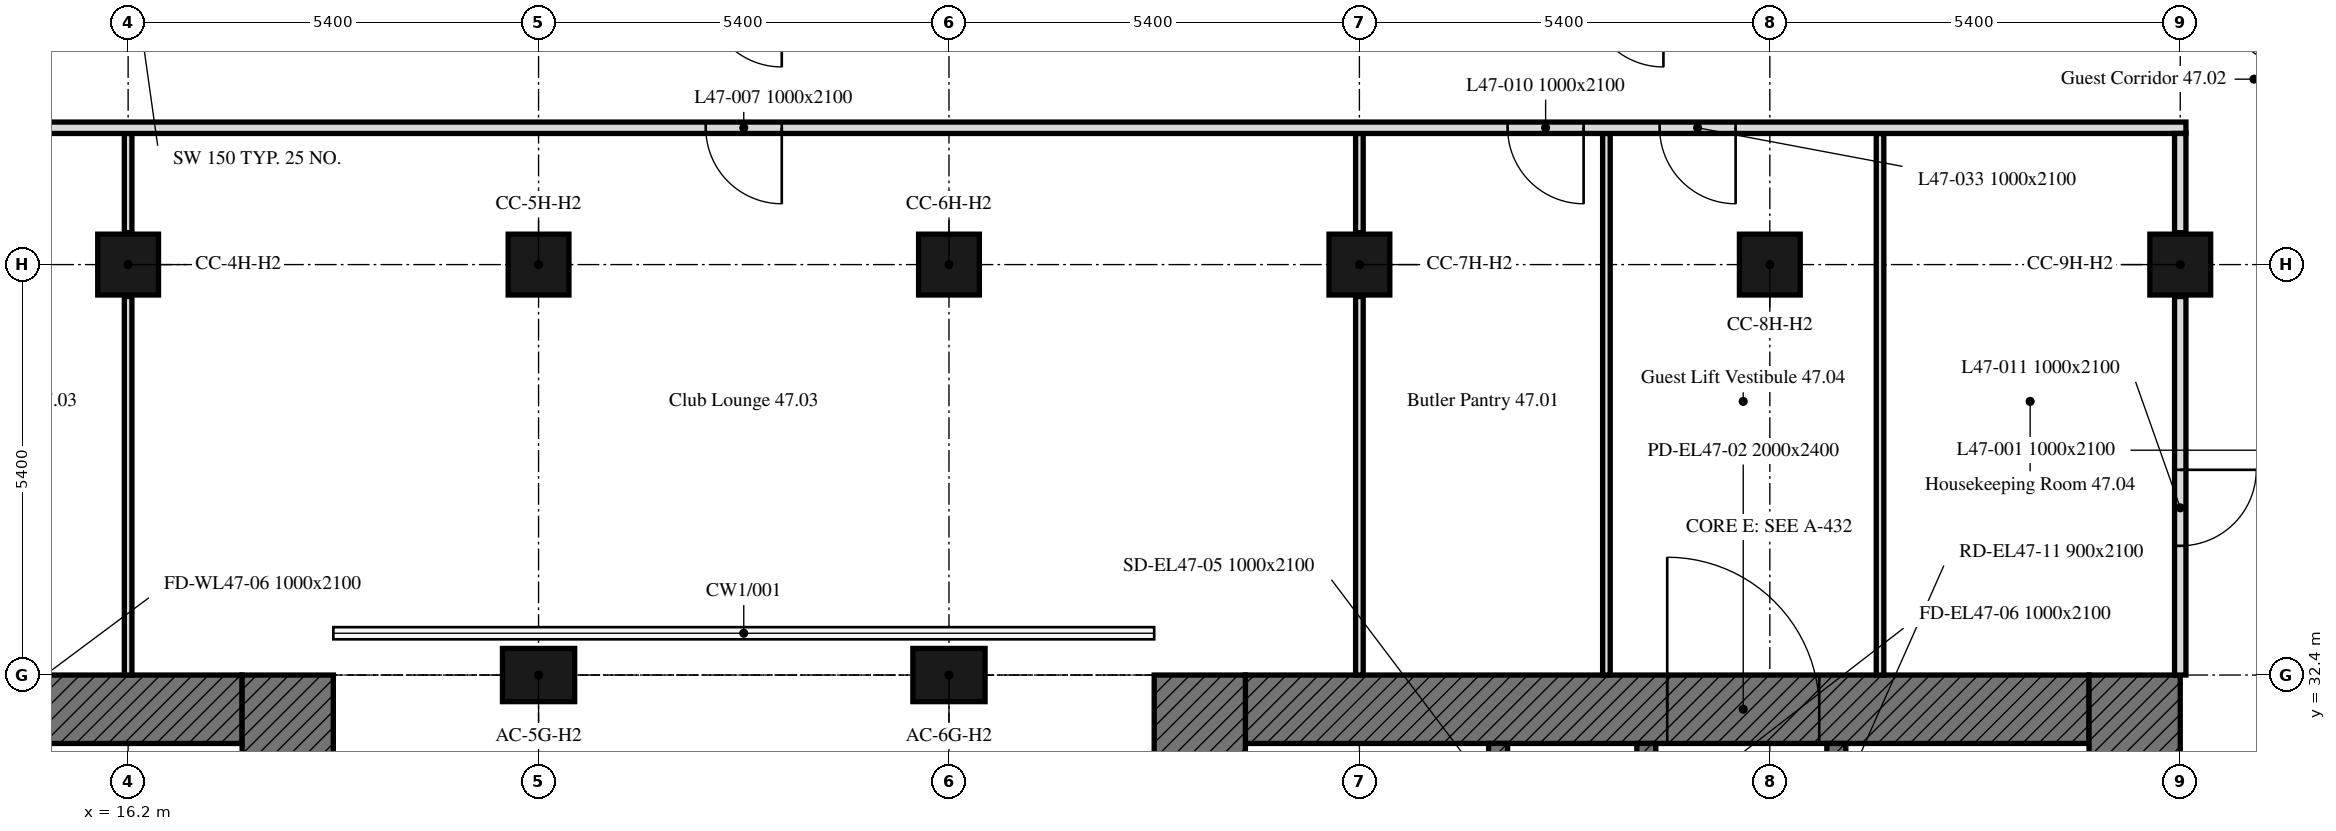
"""IFC4 building model, lengths in metres.
Left out: names, types, materials, properties, quantities, classifications, styles, units other than length and angle.
Written with IfcOpenShell. Run it as: python <this file> out.ifc"""

import sys

from ifc_helpers import new_model, si_unit, direction, frame, frame_2d, origin, origin_2d, place, context, subcontext, project, spatial, rectangle, extrude, element, fill, save


model = new_model("IFC4")
c1 = context("Model", 3, precision=1e-05, world=origin(), true_north=direction((0.0, 1.0)))
c2 = subcontext(c1, "Body", "Model", "MODEL_VIEW")
j1 = project(units=[si_unit("LENGTHUNIT", "METRE"), si_unit("PLANEANGLEUNIT", "RADIAN")], contexts=[c1])
p1 = place(None, origin())
s1 = spatial("IfcSite", under=j1, at=p1, CompositionType="ELEMENT")
p2 = place(p1, origin())
s2 = spatial("IfcBuilding", under=s1, at=p2, CompositionType="ELEMENT")
p3 = place(p2, frame((0.0, 0.0, 193.9)))
s3 = spatial("IfcBuildingStorey", under=s2, at=p3, CompositionType="ELEMENT", Elevation=193.9)
for number, where, z_axis, x_axis in (
    (1, (21.6, 32.4, 0.0), (0.0, 0.0, 1.0), (1.0, 0.0, 0.0)),
    (2, (27.0, 32.4, 0.0), (0.0, 0.0, 1.0), (1.0, 0.0, 0.0)),
):
    element("IfcColumn", number, at=place(p3, frame(where, z_axis=z_axis, x_axis=x_axis)), inside=s3, PredefinedType="COLUMN", context=c2, shape_type="SweptSolid", body=[
        extrude(rectangle(XDim=0.95, YDim=0.7, at=origin_2d()), origin(), (0.0, 0.0, 1.0), 3.0),
    ])
for number, where, z_axis, x_axis in (
    (3, (16.2, 37.8, 0.0), (0.0, 0.0, 1.0), (1.0, 0.0, 0.0)),
    (4, (21.6, 37.8, 0.0), (0.0, 0.0, 1.0), (1.0, 0.0, 0.0)),
    (5, (27.0, 37.8, 0.0), (0.0, 0.0, 1.0), (1.0, 0.0, 0.0)),
    (6, (32.4, 37.8, 0.0), (0.0, 0.0, 1.0), (1.0, 0.0, 0.0)),
    (7, (37.8, 37.8, 0.0), (0.0, 0.0, 1.0), (1.0, 0.0, 0.0)),
    (8, (43.2, 37.8, 0.0), (0.0, 0.0, 1.0), (1.0, 0.0, 0.0)),
):
    element("IfcColumn", number, at=place(p3, frame(where, z_axis=z_axis, x_axis=x_axis)), inside=s3, PredefinedType="COLUMN", context=c2, shape_type="SweptSolid", body=[
        extrude(rectangle(XDim=0.8, YDim=0.8, at=origin_2d()), origin(), (0.0, 0.0, 1.0), 3.0),
    ])
p4 = place(p3, frame((6.6, 31.95, 0.0), z_axis=(0.0, 0.0, 1.0), x_axis=(1.0, 0.0, 0.0)))
e9 = element("IfcWall", 9, at=p4, inside=s3, PredefinedType="SOLIDWALL", context=c2, shape_type="SweptSolid", body=[
    extrude(rectangle(XDim=11.1, YDim=0.9, at=frame_2d((5.55, 0.0))), origin(), (0.0, 0.0, 1.0), 3.0),
])
p5 = place(p4, frame((3.55, 0.0, 0.0)))
e10 = element("IfcOpeningElement", 10, at=p5, cuts=e9, PredefinedType="OPENING", context=c2, shape_type="SweptSolid", body=[
    extrude(rectangle(XDim=2.0, YDim=2.4, at=frame_2d((1.0, 1.2))), frame((0.0, 0.45, 0.0), z_axis=(0.0, -1.0, 0.0), x_axis=(1.0, 0.0, 0.0)), (0.0, 0.0, 1.0), 0.9),
])
p6 = place(p3, frame((18.3, 32.4, 0.0), z_axis=(0.0, 0.0, 1.0), x_axis=(0.0, -1.0, 0.0)))
e11 = element("IfcWall", 11, at=p6, inside=s3, PredefinedType="SOLIDWALL", context=c2, shape_type="SweptSolid", body=[
    extrude(rectangle(XDim=16.2, YDim=1.2, at=frame_2d((8.1, 0.0))), origin(), (0.0, 0.0, 1.0), 3.0),
])
p7 = place(p3, frame((30.9, 31.95, 0.0), z_axis=(0.0, 0.0, 1.0), x_axis=(1.0, 0.0, 0.0)))
e12 = element("IfcWall", 12, at=p7, inside=s3, PredefinedType="SOLIDWALL", context=c2, shape_type="SweptSolid", body=[
    extrude(rectangle(XDim=11.1, YDim=0.9, at=frame_2d((5.55, 0.0))), origin(), (0.0, 0.0, 1.0), 3.0),
])
p8 = place(p7, frame((5.55, 0.0, 0.0)))
e13 = element("IfcOpeningElement", 13, at=p8, cuts=e12, PredefinedType="OPENING", context=c2, shape_type="SweptSolid", body=[
    extrude(rectangle(XDim=2.0, YDim=2.4, at=frame_2d((1.0, 1.2))), frame((0.0, 0.45, 0.0), z_axis=(0.0, -1.0, 0.0), x_axis=(1.0, 0.0, 0.0)), (0.0, 0.0, 1.0), 0.9),
])
for number, where, z_axis, x_axis in (
    (14, (42.6, 32.4, 0.0), (0.0, 0.0, 1.0), (0.0, -1.0, 0.0)),
    (15, (30.3, 16.2, 0.0), (0.0, 0.0, 1.0), (0.0, 1.0, 0.0)),
):
    element("IfcWall", number, at=place(p3, frame(where, z_axis=z_axis, x_axis=x_axis)), inside=s3, PredefinedType="SOLIDWALL", context=c2, shape_type="SweptSolid", body=[
        extrude(rectangle(XDim=16.2, YDim=1.2, at=frame_2d((8.1, 0.0))), origin(), (0.0, 0.0, 1.0), 3.0),
    ])
p9 = place(p3, frame((38.675, 17.1, 0.0), z_axis=(0.0, 0.0, 1.0), x_axis=(0.0, 1.0, 0.0)))
e16 = element("IfcWall", 16, at=p9, inside=s3, PredefinedType="SOLIDWALL", context=c2, shape_type="SweptSolid", body=[
    extrude(rectangle(XDim=14.4, YDim=0.25, at=frame_2d((7.2, 0.0))), origin(), (0.0, 0.0, 1.0), 3.0),
])
p10 = place(p9, frame((4.6, 0.0, 0.0)))
e17 = element("IfcOpeningElement", 17, at=p10, cuts=e16, PredefinedType="OPENING", context=c2, shape_type="SweptSolid", body=[
    extrude(rectangle(XDim=1.0, YDim=2.1, at=frame_2d((0.5, 1.05))), frame((0.0, 0.125, 0.0), z_axis=(0.0, -1.0, 0.0), x_axis=(1.0, 0.0, 0.0)), (0.0, 0.0, 1.0), 0.25),
])
p11 = place(p9, frame((7.062, 0.0, 0.0)))
e18 = element("IfcOpeningElement", 18, at=p11, cuts=e16, PredefinedType="OPENING", context=c2, shape_type="SweptSolid", body=[
    extrude(rectangle(XDim=1.2, YDim=2.1, at=frame_2d((0.6, 1.05))), frame((0.0, 0.125, 0.0), z_axis=(0.0, -1.0, 0.0), x_axis=(1.0, 0.0, 0.0)), (0.0, 0.0, 1.0), 0.25),
])
p12 = place(p9, frame((9.472, 0.0, 0.0)))
e19 = element("IfcOpeningElement", 19, at=p12, cuts=e16, PredefinedType="OPENING", context=c2, shape_type="SweptSolid", body=[
    extrude(rectangle(XDim=0.9, YDim=2.1, at=frame_2d((0.45, 1.05))), frame((0.0, 0.125, 0.0), z_axis=(0.0, -1.0, 0.0), x_axis=(1.0, 0.0, 0.0)), (0.0, 0.0, 1.0), 0.25),
])
p13 = place(p9, frame((11.159, 0.0, 0.0)))
e20 = element("IfcOpeningElement", 20, at=p13, cuts=e16, PredefinedType="OPENING", context=c2, shape_type="SweptSolid", body=[
    extrude(rectangle(XDim=0.9, YDim=2.1, at=frame_2d((0.45, 1.05))), frame((0.0, 0.125, 0.0), z_axis=(0.0, -1.0, 0.0), x_axis=(1.0, 0.0, 0.0)), (0.0, 0.0, 1.0), 0.25),
])
p14 = place(p9, frame((13.1, 0.0, 0.0)))
e21 = element("IfcOpeningElement", 21, at=p14, cuts=e16, PredefinedType="OPENING", context=c2, shape_type="SweptSolid", body=[
    extrude(rectangle(XDim=0.9, YDim=2.1, at=frame_2d((0.45, 1.05))), frame((0.0, 0.125, 0.0), z_axis=(0.0, -1.0, 0.0), x_axis=(1.0, 0.0, 0.0)), (0.0, 0.0, 1.0), 0.25),
])
p15 = place(p3, frame((34.225, 17.1, 0.0), z_axis=(0.0, 0.0, 1.0), x_axis=(0.0, 1.0, 0.0)))
e22 = element("IfcWall", 22, at=p15, inside=s3, PredefinedType="SOLIDWALL", context=c2, shape_type="SweptSolid", body=[
    extrude(rectangle(XDim=14.4, YDim=0.25, at=frame_2d((7.2, 0.0))), origin(), (0.0, 0.0, 1.0), 3.0),
])
p16 = place(p15, frame((13.15, 0.0, 0.0)))
e23 = element("IfcOpeningElement", 23, at=p16, cuts=e22, PredefinedType="OPENING", context=c2, shape_type="SweptSolid", body=[
    extrude(rectangle(XDim=1.0, YDim=2.1, at=frame_2d((0.5, 1.05))), frame((0.0, 0.125, 0.0), z_axis=(0.0, -1.0, 0.0), x_axis=(1.0, 0.0, 0.0)), (0.0, 0.0, 1.0), 0.25),
])
p17 = place(p15, frame((0.6, 0.0, 0.0)))
e24 = element("IfcOpeningElement", 24, at=p17, cuts=e22, PredefinedType="OPENING", context=c2, shape_type="SweptSolid", body=[
    extrude(rectangle(XDim=1.1, YDim=2.1, at=frame_2d((0.55, 1.05))), frame((0.0, 0.125, 0.0), z_axis=(0.0, -1.0, 0.0), x_axis=(1.0, 0.0, 0.0)), (0.0, 0.0, 1.0), 0.25),
])
p18 = place(p15, frame((3.25, 0.0, 0.0)))
e25 = element("IfcOpeningElement", 25, at=p18, cuts=e22, PredefinedType="OPENING", context=c2, shape_type="SweptSolid", body=[
    extrude(rectangle(XDim=0.9, YDim=2.1, at=frame_2d((0.45, 1.05))), frame((0.0, 0.125, 0.0), z_axis=(0.0, -1.0, 0.0), x_axis=(1.0, 0.0, 0.0)), (0.0, 0.0, 1.0), 0.25),
])
p19 = place(p3, frame((36.175, 29.4, 0.0), z_axis=(0.0, 0.0, 1.0), x_axis=(0.0, 1.0, 0.0)))
e26 = element("IfcWall", 26, at=p19, inside=s3, PredefinedType="SOLIDWALL", context=c2, shape_type="SweptSolid", body=[
    extrude(rectangle(XDim=2.1, YDim=0.25, at=frame_2d((1.05, 0.0))), origin(), (0.0, 0.0, 1.0), 3.0),
])
p20 = place(p19, frame((0.5, 0.0, 0.0)))
e27 = element("IfcOpeningElement", 27, at=p20, cuts=e26, PredefinedType="OPENING", context=c2, shape_type="SweptSolid", body=[
    extrude(rectangle(XDim=1.0, YDim=2.1, at=frame_2d((0.5, 1.05))), frame((0.0, 0.125, 0.0), z_axis=(0.0, -1.0, 0.0), x_axis=(1.0, 0.0, 0.0)), (0.0, 0.0, 1.0), 0.25),
])
p21 = place(p3, frame((16.2, 39.525, 0.0), z_axis=(0.0, 0.0, 1.0), x_axis=(0.0, -1.0, 0.0)))
e28 = element("IfcWall", 28, at=p21, inside=s3, PredefinedType="PARTITIONING", context=c2, shape_type="SweptSolid", body=[
    extrude(rectangle(XDim=1.305, YDim=0.1, at=frame_2d((0.652, 0.0))), origin(), (0.0, 0.0, 1.0), 2.4),
])
for number, where, z_axis, x_axis in (
    (29, (16.2, 37.38, 0.0), (0.0, 0.0, 1.0), (0.0, -1.0, 0.0)),
    (30, (32.4, 32.4, 0.0), (0.0, 0.0, 1.0), (0.0, 1.0, 0.0)),
):
    element("IfcWall", number, at=place(p3, frame(where, z_axis=z_axis, x_axis=x_axis)), inside=s3, PredefinedType="PARTITIONING", context=c2, shape_type="SweptSolid", body=[
        extrude(rectangle(XDim=4.98, YDim=0.1, at=frame_2d((2.49, 0.0))), origin(), (0.0, 0.0, 1.0), 2.4),
    ])
p22 = place(p3, frame((32.4, 38.22, 0.0), z_axis=(0.0, 0.0, 1.0), x_axis=(0.0, 1.0, 0.0)))
e31 = element("IfcWall", 31, at=p22, inside=s3, PredefinedType="PARTITIONING", context=c2, shape_type="SweptSolid", body=[
    extrude(rectangle(XDim=1.305, YDim=0.1, at=frame_2d((0.652, 0.0))), origin(), (0.0, 0.0, 1.0), 2.4),
])
for number, where, z_axis, x_axis in (
    (32, (35.65, 39.525, 0.0), (0.0, 0.0, 1.0), (0.0, -1.0, 0.0)),
    (33, (39.25, 32.4, 0.0), (0.0, 0.0, 1.0), (0.0, 1.0, 0.0)),
):
    element("IfcWall", number, at=place(p3, frame(where, z_axis=z_axis, x_axis=x_axis)), inside=s3, PredefinedType="PARTITIONING", context=c2, shape_type="SweptSolid", body=[
        extrude(rectangle(XDim=7.125, YDim=0.1, at=frame_2d((3.562, 0.0))), origin(), (0.0, 0.0, 1.0), 2.4),
    ])
p23 = place(p3, frame((43.275, 39.6, 0.0), z_axis=(0.0, 0.0, 1.0), x_axis=(-1.0, 0.0, 0.0)))
e34 = element("IfcWall", 34, at=p23, inside=s3, PredefinedType="PARTITIONING", context=c2, shape_type="SweptSolid", body=[
    extrude(rectangle(XDim=36.049, YDim=0.15, at=frame_2d((18.024, 0.0))), origin(), (0.0, 0.0, 1.0), 2.4),
])
p24 = place(p23, frame((18.475, 0.0, 0.0)))
e35 = element("IfcOpeningElement", 35, at=p24, cuts=e34, PredefinedType="OPENING", context=c2, shape_type="SweptSolid", body=[
    extrude(rectangle(XDim=1.0, YDim=2.1, at=frame_2d((0.5, 1.05))), frame((0.0, 0.075, 0.0), z_axis=(0.0, -1.0, 0.0), x_axis=(1.0, 0.0, 0.0)), (0.0, 0.0, 1.0), 0.15),
])
p25 = place(p23, frame((34.799, 0.0, 0.0)))
e36 = element("IfcOpeningElement", 36, at=p25, cuts=e34, PredefinedType="OPENING", context=c2, shape_type="SweptSolid", body=[
    extrude(rectangle(XDim=1.0, YDim=2.1, at=frame_2d((0.5, 1.05))), frame((0.0, 0.075, 0.0), z_axis=(0.0, -1.0, 0.0), x_axis=(1.0, 0.0, 0.0)), (0.0, 0.0, 1.0), 0.15),
])
p26 = place(p23, frame((7.925, 0.0, 0.0)))
e37 = element("IfcOpeningElement", 37, at=p26, cuts=e34, PredefinedType="OPENING", context=c2, shape_type="SweptSolid", body=[
    extrude(rectangle(XDim=1.0, YDim=2.1, at=frame_2d((0.5, 1.05))), frame((0.0, 0.075, 0.0), z_axis=(0.0, -1.0, 0.0), x_axis=(1.0, 0.0, 0.0)), (0.0, 0.0, 1.0), 0.15),
])
p27 = place(p23, frame((29.025, 0.0, 0.0)))
e38 = element("IfcOpeningElement", 38, at=p27, cuts=e34, PredefinedType="OPENING", context=c2, shape_type="SweptSolid", body=[
    extrude(rectangle(XDim=1.0, YDim=2.1, at=frame_2d((0.5, 1.05))), frame((0.0, 0.075, 0.0), z_axis=(0.0, -1.0, 0.0), x_axis=(1.0, 0.0, 0.0)), (0.0, 0.0, 1.0), 0.15),
])
p28 = place(p23, frame((30.495, 0.0, 0.0)))
e39 = element("IfcOpeningElement", 39, at=p28, cuts=e34, PredefinedType="OPENING", context=c2, shape_type="SweptSolid", body=[
    extrude(rectangle(XDim=1.8, YDim=2.4, at=frame_2d((0.9, 1.2))), frame((0.0, 0.075, 0.0), z_axis=(0.0, -1.0, 0.0), x_axis=(1.0, 0.0, 0.0)), (0.0, 0.0, 1.0), 0.15),
])
p29 = place(p23, frame((5.925, 0.0, 0.0)))
e40 = element("IfcOpeningElement", 40, at=p29, cuts=e34, PredefinedType="OPENING", context=c2, shape_type="SweptSolid", body=[
    extrude(rectangle(XDim=1.0, YDim=2.1, at=frame_2d((0.5, 1.05))), frame((0.0, 0.075, 0.0), z_axis=(0.0, -1.0, 0.0), x_axis=(1.0, 0.0, 0.0)), (0.0, 0.0, 1.0), 0.15),
])
p30 = place(p3, frame((43.2, 39.525, 0.0), z_axis=(0.0, 0.0, 1.0), x_axis=(0.0, -1.0, 0.0)))
e41 = element("IfcWall", 41, at=p30, inside=s3, PredefinedType="PARTITIONING", context=c2, shape_type="SweptSolid", body=[
    extrude(rectangle(XDim=1.305, YDim=0.15, at=frame_2d((0.652, 0.0))), origin(), (0.0, 0.0, 1.0), 3.0),
])
p31 = place(p3, frame((43.2, 37.38, 0.0), z_axis=(0.0, 0.0, 1.0), x_axis=(0.0, -1.0, 0.0)))
e42 = element("IfcWall", 42, at=p31, inside=s3, PredefinedType="PARTITIONING", context=c2, shape_type="SweptSolid", body=[
    extrude(rectangle(XDim=4.98, YDim=0.15, at=frame_2d((2.49, 0.0))), origin(), (0.0, 0.0, 1.0), 3.0),
])
p32 = place(p31, frame((2.28, 0.0, 0.0)))
e43 = element("IfcOpeningElement", 43, at=p32, cuts=e42, PredefinedType="OPENING", context=c2, shape_type="SweptSolid", body=[
    extrude(rectangle(XDim=1.0, YDim=2.1, at=frame_2d((0.5, 1.05))), frame((0.0, 0.075, 0.0), z_axis=(0.0, -1.0, 0.0), x_axis=(1.0, 0.0, 0.0)), (0.0, 0.0, 1.0), 0.15),
])
p33 = place(p8, origin())
e44 = element("IfcDoor", 44, at=p33, inside=s3, OperationType="DOUBLE_DOOR_SINGLE_SWING", PredefinedType="DOOR", context=c2, shape_type="SweptSolid", body=[
    extrude(rectangle(XDim=2.0, YDim=2.4, at=frame_2d((1.0, 1.2))), frame((0.0, 0.025, 0.0), z_axis=(0.0, -1.0, 0.0), x_axis=(1.0, 0.0, 0.0)), (0.0, 0.0, 1.0), 0.05),
])
fill(e13, e44)
p34 = place(p24, origin())
e45 = element("IfcDoor", 45, at=p34, inside=s3, OperationType="SINGLE_SWING_LEFT", PredefinedType="DOOR", context=c2, shape_type="SweptSolid", body=[
    extrude(rectangle(XDim=1.0, YDim=2.1, at=frame_2d((0.5, 1.05))), frame((0.0, 0.025, 0.0), z_axis=(0.0, -1.0, 0.0), x_axis=(1.0, 0.0, 0.0)), (0.0, 0.0, 1.0), 0.05),
])
fill(e35, e45)
p35 = place(p26, origin())
e46 = element("IfcDoor", 46, at=p35, inside=s3, OperationType="SINGLE_SWING_LEFT", PredefinedType="DOOR", context=c2, shape_type="SweptSolid", body=[
    extrude(rectangle(XDim=1.0, YDim=2.1, at=frame_2d((0.5, 1.05))), frame((0.0, 0.025, 0.0), z_axis=(0.0, -1.0, 0.0), x_axis=(1.0, 0.0, 0.0)), (0.0, 0.0, 1.0), 0.05),
])
fill(e37, e46)
p36 = place(p32, origin())
e47 = element("IfcDoor", 47, at=p36, inside=s3, OperationType="SINGLE_SWING_RIGHT", PredefinedType="DOOR", context=c2, shape_type="SweptSolid", body=[
    extrude(rectangle(XDim=1.0, YDim=2.1, at=frame_2d((0.5, 1.05))), frame((0.0, 0.025, 0.0), z_axis=(0.0, -1.0, 0.0), x_axis=(1.0, 0.0, 0.0)), (0.0, 0.0, 1.0), 0.05),
])
fill(e43, e47)
p37 = place(p29, origin())
e48 = element("IfcDoor", 48, at=p37, inside=s3, OperationType="SINGLE_SWING_RIGHT", PredefinedType="DOOR", context=c2, shape_type="SweptSolid", body=[
    extrude(rectangle(XDim=1.0, YDim=2.1, at=frame_2d((0.5, 1.05))), frame((0.0, 0.025, 0.0), z_axis=(0.0, -1.0, 0.0), x_axis=(1.0, 0.0, 0.0)), (0.0, 0.0, 1.0), 0.05),
])
fill(e40, e48)
save(model, sys.argv[1])
